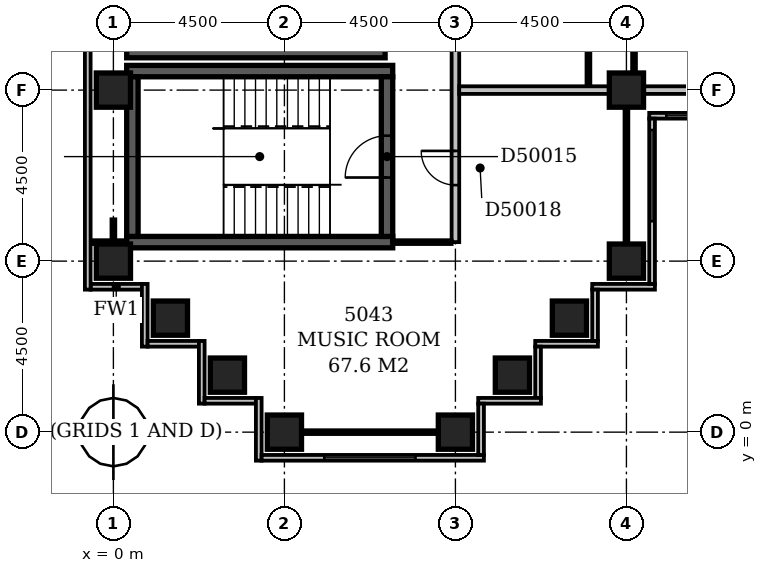
"""IFC4 building model, lengths in metres.
Left out: names, types, materials, properties, quantities, classifications, styles, units other than length and angle.
Written with IfcOpenShell. Run it as: python <this file> out.ifc"""

import sys

from ifc_helpers import new_model, si_unit, direction, frame, frame_2d, origin, origin_2d, place, context, subcontext, project, spatial, rectangle, extrude, element, fill, save


model = new_model("IFC4")
c1 = context("Model", 3, precision=1e-05, world=origin(), true_north=direction((0.0, 1.0)))
c2 = subcontext(c1, "Body", "Model", "MODEL_VIEW")
j1 = project(units=[si_unit("LENGTHUNIT", "METRE"), si_unit("PLANEANGLEUNIT", "RADIAN")], contexts=[c1])
p1 = place(None, origin())
s1 = spatial("IfcSite", under=j1, at=p1, CompositionType="ELEMENT")
p2 = place(p1, origin())
s2 = spatial("IfcBuilding", under=s1, at=p2, CompositionType="ELEMENT")
p3 = place(p2, frame((0.0, 0.0, 197.0)))
s3 = spatial("IfcBuildingStorey", under=s2, at=p3, CompositionType="ELEMENT", Elevation=197.0)
for number, where, z_axis, x_axis in (
    (1, (0.35, 5.0, -0.3), (0.0, 0.0, 1.0), (1.0, 0.0, 0.0)),
    (2, (0.35, 9.5, -0.3), (0.0, 0.0, 1.0), (1.0, 0.0, 0.0)),
):
    element("IfcWall", number, at=place(p3, frame(where, z_axis=z_axis, x_axis=x_axis)), inside=s3, PredefinedType="SHEAR", context=c2, shape_type="SweptSolid", body=[
        extrude(rectangle(XDim=7.0, YDim=0.3, at=frame_2d((3.5, 0.0))), origin(), (0.0, 0.0, 1.0), 3.6),
    ])
p4 = place(p3, frame((0.35, 10.0, -0.3), z_axis=(0.0, 0.0, 1.0), x_axis=(1.0, 0.0, 0.0)))
e3 = element("IfcWall", 3, at=p4, inside=s3, PredefinedType="SHEAR", context=c2, shape_type="SweptSolid", body=[
    extrude(rectangle(XDim=6.8, YDim=0.3, at=frame_2d((3.4, 0.0))), origin(), (0.0, 0.0, 1.0), 3.6),
])
p5 = place(p3, frame((0.5, 5.15, -0.3), z_axis=(0.0, 0.0, 1.0), x_axis=(0.0, 1.0, 0.0)))
e4 = element("IfcWall", 4, at=p5, inside=s3, PredefinedType="SHEAR", context=c2, shape_type="SweptSolid", body=[
    extrude(rectangle(XDim=4.2, YDim=0.3, at=frame_2d((2.1, 0.0))), origin(), (0.0, 0.0, 1.0), 3.6),
])
p6 = place(p3, frame((7.2, 5.15, -0.3), z_axis=(0.0, 0.0, 1.0), x_axis=(0.0, 1.0, 0.0)))
e5 = element("IfcWall", 5, at=p6, inside=s3, PredefinedType="SHEAR", context=c2, shape_type="SweptSolid", body=[
    extrude(rectangle(XDim=4.2, YDim=0.3, at=frame_2d((2.1, 0.0))), origin(), (0.0, 0.0, 1.0), 3.6),
])
p7 = place(p6, frame((1.55, 0.0, 0.3)))
e6 = element("IfcOpeningElement", 6, at=p7, cuts=e5, PredefinedType="OPENING", context=c2, shape_type="SweptSolid", body=[
    extrude(rectangle(XDim=1.1, YDim=2.1, at=frame_2d((0.55, 1.05))), frame((0.0, 0.162, 0.0), z_axis=(0.0, -1.0, 0.0), x_axis=(1.0, 0.0, 0.0)), (0.0, 0.0, 1.0), 0.324),
])
for number, where, z_axis, x_axis in (
    (7, (4.5, 0.0, -0.3), (0.0, 0.0, 1.0), (1.0, 0.0, 0.0)),
    (8, (9.0, 0.0, -0.3), (0.0, 0.0, 1.0), (1.0, 0.0, 0.0)),
    (9, (3.0, 1.5, -0.3), (0.0, 0.0, 1.0), (1.0, 0.0, 0.0)),
    (10, (10.5, 1.5, -0.3), (0.0, 0.0, 1.0), (1.0, 0.0, 0.0)),
    (11, (1.5, 3.0, -0.3), (0.0, 0.0, 1.0), (1.0, 0.0, 0.0)),
    (12, (12.0, 3.0, -0.3), (0.0, 0.0, 1.0), (1.0, 0.0, 0.0)),
    (13, (0.0, 4.5, -0.3), (0.0, 0.0, 1.0), (1.0, 0.0, 0.0)),
    (14, (13.5, 4.5, -0.3), (0.0, 0.0, 1.0), (1.0, 0.0, 0.0)),
    (15, (0.0, 9.0, -0.3), (0.0, 0.0, 1.0), (1.0, 0.0, 0.0)),
    (16, (13.5, 9.0, -0.3), (0.0, 0.0, 1.0), (1.0, 0.0, 0.0)),
):
    element("IfcColumn", number, at=place(p3, frame(where, z_axis=z_axis, x_axis=x_axis)), inside=s3, PredefinedType="COLUMN", context=c2, shape_type="SweptSolid", body=[
        extrude(rectangle(XDim=0.9, YDim=0.9, at=origin_2d()), origin(), (0.0, 0.0, 1.0), 3.6),
    ])
p8 = place(p3, frame((-0.6, 3.825, 0.0), z_axis=(0.0, 0.0, 1.0), x_axis=(1.0, 0.0, 0.0)))
e17 = element("IfcWall", 17, at=p8, inside=s3, PredefinedType="STANDARD", context=c2, shape_type="SweptSolid", body=[
    extrude(rectangle(XDim=1.35, YDim=0.15, at=frame_2d((0.675, 0.0))), origin(), (0.0, 0.0, 1.0), 2.7),
])
p9 = place(p3, frame((0.825, 3.9, 0.0), z_axis=(0.0, 0.0, 1.0), x_axis=(0.0, -1.0, 0.0)))
e18 = element("IfcWall", 18, at=p9, inside=s3, PredefinedType="STANDARD", context=c2, shape_type="SweptSolid", body=[
    extrude(rectangle(XDim=1.65, YDim=0.15, at=frame_2d((0.825, 0.0))), origin(), (0.0, 0.0, 1.0), 2.7),
])
p10 = place(p3, frame((0.9, 2.325, 0.0), z_axis=(0.0, 0.0, 1.0), x_axis=(1.0, 0.0, 0.0)))
e19 = element("IfcWall", 19, at=p10, inside=s3, PredefinedType="STANDARD", context=c2, shape_type="SweptSolid", body=[
    extrude(rectangle(XDim=1.35, YDim=0.15, at=frame_2d((0.675, 0.0))), origin(), (0.0, 0.0, 1.0), 2.7),
])
p11 = place(p3, frame((2.325, 2.4, 0.0), z_axis=(0.0, 0.0, 1.0), x_axis=(0.0, -1.0, 0.0)))
e20 = element("IfcWall", 20, at=p11, inside=s3, PredefinedType="STANDARD", context=c2, shape_type="SweptSolid", body=[
    extrude(rectangle(XDim=1.65, YDim=0.15, at=frame_2d((0.825, 0.0))), origin(), (0.0, 0.0, 1.0), 2.7),
])
p12 = place(p3, frame((2.4, 0.825, 0.0), z_axis=(0.0, 0.0, 1.0), x_axis=(1.0, 0.0, 0.0)))
e21 = element("IfcWall", 21, at=p12, inside=s3, PredefinedType="STANDARD", context=c2, shape_type="SweptSolid", body=[
    extrude(rectangle(XDim=1.35, YDim=0.15, at=frame_2d((0.675, 0.0))), origin(), (0.0, 0.0, 1.0), 2.7),
])
p13 = place(p3, frame((3.825, 0.9, 0.0), z_axis=(0.0, 0.0, 1.0), x_axis=(0.0, -1.0, 0.0)))
e22 = element("IfcWall", 22, at=p13, inside=s3, PredefinedType="STANDARD", context=c2, shape_type="SweptSolid", body=[
    extrude(rectangle(XDim=1.65, YDim=0.15, at=frame_2d((0.825, 0.0))), origin(), (0.0, 0.0, 1.0), 2.7),
])
p14 = place(p3, frame((3.9, -0.675, 0.0), z_axis=(0.0, 0.0, 1.0), x_axis=(1.0, 0.0, 0.0)))
e23 = element("IfcWall", 23, at=p14, inside=s3, PredefinedType="STANDARD", context=c2, shape_type="SweptSolid", body=[
    extrude(rectangle(XDim=5.85, YDim=0.15, at=frame_2d((2.925, 0.0))), origin(), (0.0, 0.0, 1.0), 2.7),
])
p15 = place(p14, frame((1.65, 0.0, 0.6)))
e24 = element("IfcOpeningElement", 24, at=p15, cuts=e23, PredefinedType="OPENING", context=c2, shape_type="SweptSolid", body=[
    extrude(rectangle(XDim=2.4, YDim=1.8, at=frame_2d((1.2, 0.9))), frame((0.0, 0.087, 0.0), z_axis=(0.0, -1.0, 0.0), x_axis=(1.0, 0.0, 0.0)), (0.0, 0.0, 1.0), 0.174),
])
p16 = place(p3, frame((9.675, -0.6, 0.0), z_axis=(0.0, 0.0, 1.0), x_axis=(0.0, 1.0, 0.0)))
e25 = element("IfcWall", 25, at=p16, inside=s3, PredefinedType="STANDARD", context=c2, shape_type="SweptSolid", body=[
    extrude(rectangle(XDim=1.35, YDim=0.15, at=frame_2d((0.675, 0.0))), origin(), (0.0, 0.0, 1.0), 2.7),
])
p17 = place(p3, frame((9.6, 0.825, 0.0), z_axis=(0.0, 0.0, 1.0), x_axis=(1.0, 0.0, 0.0)))
e26 = element("IfcWall", 26, at=p17, inside=s3, PredefinedType="STANDARD", context=c2, shape_type="SweptSolid", body=[
    extrude(rectangle(XDim=1.65, YDim=0.15, at=frame_2d((0.825, 0.0))), origin(), (0.0, 0.0, 1.0), 2.7),
])
p18 = place(p3, frame((11.175, 0.9, 0.0), z_axis=(0.0, 0.0, 1.0), x_axis=(0.0, 1.0, 0.0)))
e27 = element("IfcWall", 27, at=p18, inside=s3, PredefinedType="STANDARD", context=c2, shape_type="SweptSolid", body=[
    extrude(rectangle(XDim=1.35, YDim=0.15, at=frame_2d((0.675, 0.0))), origin(), (0.0, 0.0, 1.0), 2.7),
])
p19 = place(p3, frame((11.1, 2.325, 0.0), z_axis=(0.0, 0.0, 1.0), x_axis=(1.0, 0.0, 0.0)))
e28 = element("IfcWall", 28, at=p19, inside=s3, PredefinedType="STANDARD", context=c2, shape_type="SweptSolid", body=[
    extrude(rectangle(XDim=1.65, YDim=0.15, at=frame_2d((0.825, 0.0))), origin(), (0.0, 0.0, 1.0), 2.7),
])
p20 = place(p3, frame((12.675, 2.4, 0.0), z_axis=(0.0, 0.0, 1.0), x_axis=(0.0, 1.0, 0.0)))
e29 = element("IfcWall", 29, at=p20, inside=s3, PredefinedType="STANDARD", context=c2, shape_type="SweptSolid", body=[
    extrude(rectangle(XDim=1.35, YDim=0.15, at=frame_2d((0.675, 0.0))), origin(), (0.0, 0.0, 1.0), 2.7),
])
p21 = place(p3, frame((12.6, 3.825, 0.0), z_axis=(0.0, 0.0, 1.0), x_axis=(1.0, 0.0, 0.0)))
e30 = element("IfcWall", 30, at=p21, inside=s3, PredefinedType="STANDARD", context=c2, shape_type="SweptSolid", body=[
    extrude(rectangle(XDim=1.65, YDim=0.15, at=frame_2d((0.825, 0.0))), origin(), (0.0, 0.0, 1.0), 2.7),
])
p22 = place(p3, frame((14.175, 3.9, 0.0), z_axis=(0.0, 0.0, 1.0), x_axis=(0.0, 1.0, 0.0)))
e31 = element("IfcWall", 31, at=p22, inside=s3, PredefinedType="STANDARD", context=c2, shape_type="SweptSolid", body=[
    extrude(rectangle(XDim=4.35, YDim=0.15, at=frame_2d((2.175, 0.0))), origin(), (0.0, 0.0, 1.0), 2.7),
])
p23 = place(p22, frame((1.65, 0.0, 0.6)))
e32 = element("IfcOpeningElement", 32, at=p23, cuts=e31, PredefinedType="OPENING", context=c2, shape_type="SweptSolid", body=[
    extrude(rectangle(XDim=2.4, YDim=1.8, at=frame_2d((1.2, 0.9))), frame((0.0, 0.087, 0.0), z_axis=(0.0, -1.0, 0.0), x_axis=(1.0, 0.0, 0.0)), (0.0, 0.0, 1.0), 0.174),
])
p24 = place(p3, frame((14.1, 8.325, 0.0), z_axis=(0.0, 0.0, 1.0), x_axis=(1.0, 0.0, 0.0)))
e33 = element("IfcWall", 33, at=p24, inside=s3, PredefinedType="STANDARD", context=c2, shape_type="SweptSolid", body=[
    extrude(rectangle(XDim=4.65, YDim=0.15, at=frame_2d((2.325, 0.0))), origin(), (0.0, 0.0, 1.0), 2.7),
])
p25 = place(p24, frame((0.45, 0.0, 0.6)))
e34 = element("IfcOpeningElement", 34, at=p25, cuts=e33, PredefinedType="OPENING", context=c2, shape_type="SweptSolid", body=[
    extrude(rectangle(XDim=2.4, YDim=1.8, at=frame_2d((1.2, 0.9))), frame((0.0, 0.087, 0.0), z_axis=(0.0, -1.0, 0.0), x_axis=(1.0, 0.0, 0.0)), (0.0, 0.0, 1.0), 0.174),
])
p26 = place(p3, frame((-0.675, 59.1, 0.0), z_axis=(0.0, 0.0, 1.0), x_axis=(0.0, -1.0, 0.0)))
e35 = element("IfcWall", 35, at=p26, inside=s3, PredefinedType="STANDARD", context=c2, shape_type="SweptSolid", body=[
    extrude(rectangle(XDim=55.35, YDim=0.15, at=frame_2d((27.675, 0.0))), origin(), (0.0, 0.0, 1.0), 2.7),
])
p27 = place(p3, frame((4.95, 0.0, 0.0), z_axis=(0.0, 0.0, 1.0), x_axis=(1.0, 0.0, 0.0)))
e36 = element("IfcWall", 36, at=p27, inside=s3, PredefinedType="PARTITIONING", context=c2, shape_type="SweptSolid", body=[
    extrude(rectangle(XDim=3.6, YDim=0.1, at=frame_2d((1.8, 0.0))), origin(), (0.0, 0.0, 1.0), 2.7),
])
p28 = place(p3, frame((0.0, 4.95, 0.0), z_axis=(0.0, 0.0, 1.0), x_axis=(0.0, 1.0, 0.0)))
e37 = element("IfcWall", 37, at=p28, inside=s3, PredefinedType="PARTITIONING", context=c2, shape_type="SweptSolid", body=[
    extrude(rectangle(XDim=0.65, YDim=0.1, at=frame_2d((0.325, 0.0))), origin(), (0.0, 0.0, 1.0), 2.7),
])
p29 = place(p3, frame((13.5, 4.95, 0.0), z_axis=(0.0, 0.0, 1.0), x_axis=(0.0, 1.0, 0.0)))
e38 = element("IfcWall", 38, at=p29, inside=s3, PredefinedType="PARTITIONING", context=c2, shape_type="SweptSolid", body=[
    extrude(rectangle(XDim=3.6, YDim=0.1, at=frame_2d((1.8, 0.0))), origin(), (0.0, 0.0, 1.0), 2.7),
])
p30 = place(p3, frame((-0.6, 5.0, 0.0), z_axis=(0.0, 0.0, 1.0), x_axis=(1.0, 0.0, 0.0)))
e39 = element("IfcWall", 39, at=p30, inside=s3, PredefinedType="PARTITIONING", context=c2, shape_type="SweptSolid", body=[
    extrude(rectangle(XDim=0.951, YDim=0.1, at=frame_2d((0.476, 0.0))), origin(), (0.0, 0.0, 1.0), 3.3),
])
p31 = place(p3, frame((7.349, 5.0, 0.0), z_axis=(0.0, 0.0, 1.0), x_axis=(1.0, 0.0, 0.0)))
e40 = element("IfcWall", 40, at=p31, inside=s3, PredefinedType="PARTITIONING", context=c2, shape_type="SweptSolid", body=[
    extrude(rectangle(XDim=1.551, YDim=0.1, at=frame_2d((0.775, 0.0))), origin(), (0.0, 0.0, 1.0), 3.3),
])
p32 = place(p3, frame((9.0, 5.0, 0.0), z_axis=(0.0, 0.0, 1.0), x_axis=(0.0, 1.0, 0.0)))
e41 = element("IfcWall", 41, at=p32, inside=s3, PredefinedType="PARTITIONING", context=c2, shape_type="SweptSolid", body=[
    extrude(rectangle(XDim=31.0, YDim=0.2, at=frame_2d((15.5, 0.0))), origin(), (0.0, 0.0, 1.0), 3.3),
])
p33 = place(p32, frame((18.4, 0.0, 0.0)))
e42 = element("IfcOpeningElement", 42, at=p33, cuts=e41, PredefinedType="OPENING", context=c2, shape_type="SweptSolid", body=[
    extrude(rectangle(XDim=1.0, YDim=2.1, at=frame_2d((0.5, 1.05))), frame((0.0, 0.112, 0.0), z_axis=(0.0, -1.0, 0.0), x_axis=(1.0, 0.0, 0.0)), (0.0, 0.0, 1.0), 0.224),
])
p34 = place(p32, frame((11.7, 0.0, 0.0)))
e43 = element("IfcOpeningElement", 43, at=p34, cuts=e41, PredefinedType="OPENING", context=c2, shape_type="SweptSolid", body=[
    extrude(rectangle(XDim=1.0, YDim=2.1, at=frame_2d((0.5, 1.05))), frame((0.0, 0.112, 0.0), z_axis=(0.0, -1.0, 0.0), x_axis=(1.0, 0.0, 0.0)), (0.0, 0.0, 1.0), 0.224),
])
p35 = place(p32, frame((1.5, 0.0, 0.0)))
e44 = element("IfcOpeningElement", 44, at=p35, cuts=e41, PredefinedType="OPENING", context=c2, shape_type="SweptSolid", body=[
    extrude(rectangle(XDim=0.9, YDim=2.1, at=frame_2d((0.45, 1.05))), frame((0.0, 0.112, 0.0), z_axis=(0.0, -1.0, 0.0), x_axis=(1.0, 0.0, 0.0)), (0.0, 0.0, 1.0), 0.224),
])
p36 = place(p3, frame((9.1, 9.0, 0.0), z_axis=(0.0, 0.0, 1.0), x_axis=(1.0, 0.0, 0.0)))
e45 = element("IfcWall", 45, at=p36, inside=s3, PredefinedType="PARTITIONING", context=c2, shape_type="SweptSolid", body=[
    extrude(rectangle(XDim=3.95, YDim=0.2, at=frame_2d((1.975, 0.0))), origin(), (0.0, 0.0, 1.0), 3.3),
])
p37 = place(p3, frame((13.95, 9.0, 0.0), z_axis=(0.0, 0.0, 1.0), x_axis=(1.0, 0.0, 0.0)))
e46 = element("IfcWall", 46, at=p37, inside=s3, PredefinedType="PARTITIONING", context=c2, shape_type="SweptSolid", body=[
    extrude(rectangle(XDim=3.6, YDim=0.2, at=frame_2d((1.8, 0.0))), origin(), (0.0, 0.0, 1.0), 2.7),
])
p38 = place(p3, frame((12.5, 9.1, 0.0), z_axis=(0.0, 0.0, 1.0), x_axis=(0.0, 1.0, 0.0)))
e47 = element("IfcWall", 47, at=p38, inside=s3, PredefinedType="PARTITIONING", context=c2, shape_type="SweptSolid", body=[
    extrude(rectangle(XDim=7.3, YDim=0.1, at=frame_2d((3.65, 0.0))), origin(), (0.0, 0.0, 1.0), 3.3),
])
p39 = place(p38, frame((5.7, 0.0, 0.0)))
e48 = element("IfcOpeningElement", 48, at=p39, cuts=e47, PredefinedType="OPENING", context=c2, shape_type="SweptSolid", body=[
    extrude(rectangle(XDim=0.8, YDim=2.1, at=frame_2d((0.4, 1.05))), frame((0.0, 0.062, 0.0), z_axis=(0.0, -1.0, 0.0), x_axis=(1.0, 0.0, 0.0)), (0.0, 0.0, 1.0), 0.124),
])
p40 = place(p38, frame((1.95, 0.0, 0.0)))
e49 = element("IfcOpeningElement", 49, at=p40, cuts=e47, PredefinedType="OPENING", context=c2, shape_type="SweptSolid", body=[
    extrude(rectangle(XDim=0.9, YDim=2.1, at=frame_2d((0.45, 1.05))), frame((0.0, 0.062, 0.0), z_axis=(0.0, -1.0, 0.0), x_axis=(1.0, 0.0, 0.0)), (0.0, 0.0, 1.0), 0.124),
])
p41 = place(p3, frame((13.7, 9.45, 0.0), z_axis=(0.0, 0.0, 1.0), x_axis=(0.0, 1.0, 0.0)))
e50 = element("IfcWall", 50, at=p41, inside=s3, PredefinedType="PARTITIONING", context=c2, shape_type="SweptSolid", body=[
    extrude(rectangle(XDim=8.45, YDim=0.1, at=frame_2d((4.225, 0.0))), origin(), (0.0, 0.0, 1.0), 3.3),
])
p42 = place(p41, frame((1.35, 0.0, 0.0)))
e51 = element("IfcOpeningElement", 51, at=p42, cuts=e50, PredefinedType="OPENING", context=c2, shape_type="SweptSolid", body=[
    extrude(rectangle(XDim=0.9, YDim=2.1, at=frame_2d((0.45, 1.05))), frame((0.0, 0.062, 0.0), z_axis=(0.0, -1.0, 0.0), x_axis=(1.0, 0.0, 0.0)), (0.0, 0.0, 1.0), 0.124),
])
p43 = place(p41, frame((5.85, 0.0, 0.0)))
e52 = element("IfcOpeningElement", 52, at=p43, cuts=e50, PredefinedType="OPENING", context=c2, shape_type="SweptSolid", body=[
    extrude(rectangle(XDim=0.9, YDim=2.1, at=frame_2d((0.45, 1.05))), frame((0.0, 0.062, 0.0), z_axis=(0.0, -1.0, 0.0), x_axis=(1.0, 0.0, 0.0)), (0.0, 0.0, 1.0), 0.124),
])
p44 = place(p15, origin())
e53 = element("IfcWindow", 53, at=p44, inside=s3, PartitioningType="SINGLE_PANEL", PredefinedType="WINDOW", context=c2, shape_type="SweptSolid", body=[
    extrude(rectangle(XDim=2.4, YDim=1.8, at=frame_2d((1.2, 0.9))), frame((0.0, 0.03, 0.0), z_axis=(0.0, -1.0, 0.0), x_axis=(1.0, 0.0, 0.0)), (0.0, 0.0, 1.0), 0.06),
])
fill(e24, e53)
p45 = place(p23, origin())
e54 = element("IfcWindow", 54, at=p45, inside=s3, PartitioningType="SINGLE_PANEL", PredefinedType="WINDOW", context=c2, shape_type="SweptSolid", body=[
    extrude(rectangle(XDim=2.4, YDim=1.8, at=frame_2d((1.2, 0.9))), frame((0.0, 0.03, 0.0), z_axis=(0.0, -1.0, 0.0), x_axis=(1.0, 0.0, 0.0)), (0.0, 0.0, 1.0), 0.06),
])
fill(e32, e54)
p46 = place(p25, origin())
e55 = element("IfcWindow", 55, at=p46, inside=s3, PartitioningType="SINGLE_PANEL", PredefinedType="WINDOW", context=c2, shape_type="SweptSolid", body=[
    extrude(rectangle(XDim=2.4, YDim=1.8, at=frame_2d((1.2, 0.9))), frame((0.0, 0.03, 0.0), z_axis=(0.0, -1.0, 0.0), x_axis=(1.0, 0.0, 0.0)), (0.0, 0.0, 1.0), 0.06),
])
fill(e34, e55)
p47 = place(p7, origin())
e56 = element("IfcDoor", 56, at=p47, inside=s3, OperationType="SINGLE_SWING_LEFT", PredefinedType="DOOR", context=c2, shape_type="SweptSolid", body=[
    extrude(rectangle(XDim=1.1, YDim=2.1, at=frame_2d((0.55, 1.05))), frame((0.0, 0.025, 0.0), z_axis=(0.0, -1.0, 0.0), x_axis=(1.0, 0.0, 0.0)), (0.0, 0.0, 1.0), 0.05),
])
fill(e6, e56)
p48 = place(p35, frame((0.9, 0.0, 0.0), z_axis=(0.0, 0.0, 1.0), x_axis=(-1.0, 0.0, 0.0)))
e57 = element("IfcDoor", 57, at=p48, inside=s3, OperationType="SINGLE_SWING_LEFT", PredefinedType="DOOR", context=c2, shape_type="SweptSolid", body=[
    extrude(rectangle(XDim=0.9, YDim=2.1, at=frame_2d((0.45, 1.05))), frame((0.0, 0.025, 0.0), z_axis=(0.0, -1.0, 0.0), x_axis=(1.0, 0.0, 0.0)), (0.0, 0.0, 1.0), 0.05),
])
fill(e44, e57)
save(model, sys.argv[1])
